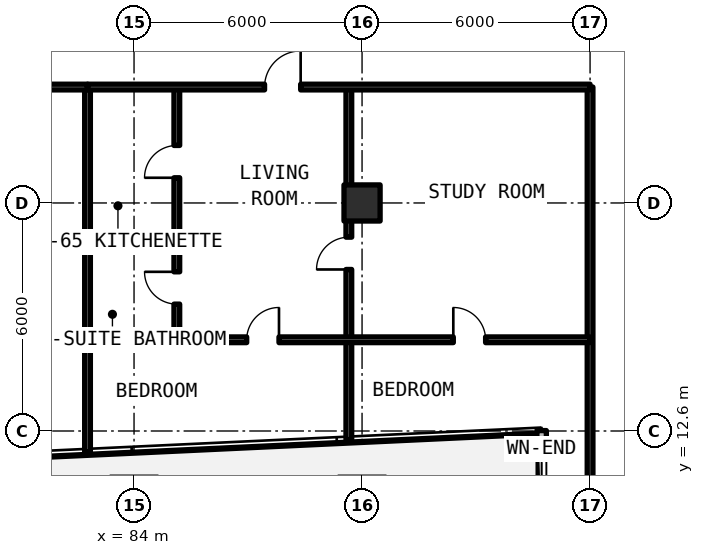
"""IFC4 building model, lengths in metres.
Left out: names, types, materials, properties, quantities, classifications, styles, units other than length and angle.
Written with IfcOpenShell. Run it as: python <this file> out.ifc"""

import sys

from ifc_helpers import new_model, si_unit, direction, frame, frame_2d, origin, origin_2d, place, context, subcontext, project, spatial, rectangle, extrude, element, fill, save


model = new_model("IFC4")
c1 = context("Model", 3, precision=1e-05, world=origin(), true_north=direction((0.0, 1.0)))
c2 = subcontext(c1, "Body", "Model", "MODEL_VIEW")
j1 = project(units=[si_unit("LENGTHUNIT", "METRE"), si_unit("PLANEANGLEUNIT", "RADIAN")], contexts=[c1])
p1 = place(None, origin())
s1 = spatial("IfcSite", under=j1, at=p1, CompositionType="ELEMENT")
p2 = place(p1, origin())
s2 = spatial("IfcBuilding", under=s1, at=p2, CompositionType="ELEMENT")
p3 = place(p2, frame((0.0, 0.0, 108.57)))
s3 = spatial("IfcBuildingStorey", under=s2, at=p3, CompositionType="ELEMENT", Elevation=108.57)
p4 = place(p3, frame((90.0, 18.6, 0.0), z_axis=(0.0, 0.0, 1.0), x_axis=(1.0, 0.0, 0.0)))
e1 = element("IfcColumn", 1, at=p4, inside=s3, PredefinedType="COLUMN", context=c2, shape_type="SweptSolid", body=[
    extrude(rectangle(XDim=0.95, YDim=0.95, at=origin_2d()), origin(), (0.0, 0.0, 1.0), 3.63),
])
p5 = place(p3, frame((94.725, 12.611, 0.0), z_axis=(0.0, 0.0, 1.0), x_axis=(0.0, -1.0, 0.0)))
e2 = element("IfcWall", 2, at=p5, inside=s3, PredefinedType="SOLIDWALL", context=c2, shape_type="SweptSolid", body=[
    extrude(rectangle(XDim=2.886, YDim=0.25, at=frame_2d((1.443, 0.0))), origin(), (0.0, 0.0, 1.0), 3.41),
])
p6 = place(p5, frame((0.743, 0.0, 0.78)))
e3 = element("IfcOpeningElement", 3, at=p6, cuts=e2, PredefinedType="OPENING", context=c2, shape_type="SweptSolid", body=[
    extrude(rectangle(XDim=1.4, YDim=1.65, at=frame_2d((0.7, 0.825))), frame((0.0, 0.135, 0.0), z_axis=(0.0, -1.0, 0.0), x_axis=(1.0, 0.0, 0.0)), (0.0, 0.0, 1.0), 0.27),
])
p7 = place(p3, frame((96.0, 9.725, 0.0), z_axis=(0.0, 0.0, 1.0), x_axis=(0.0, 1.0, 0.0)))
e4 = element("IfcWall", 4, at=p7, inside=s3, PredefinedType="SOLIDWALL", context=c2, shape_type="SweptSolid", body=[
    extrude(rectangle(XDim=11.925, YDim=0.15, at=frame_2d((5.962, 0.0))), origin(), (0.0, 0.0, 1.0), 2.63),
])
p8 = place(p3, frame((82.776, 12.05, 0.0), z_axis=(0.0, 0.0, 1.0), x_axis=(0.0, 1.0, 0.0)))
e5 = element("IfcWall", 5, at=p8, inside=s3, PredefinedType="SOLIDWALL", context=c2, shape_type="SweptSolid", body=[
    extrude(rectangle(XDim=9.6, YDim=0.15, at=frame_2d((4.8, 0.0))), origin(), (0.0, 0.0, 1.0), 2.63),
])
p9 = place(p3, frame((72.557, 21.65, 0.0), z_axis=(0.0, 0.0, 1.0), x_axis=(1.0, 0.0, 0.0)))
e6 = element("IfcWall", 6, at=p9, inside=s3, PredefinedType="SOLIDWALL", context=c2, shape_type="SweptSolid", body=[
    extrude(rectangle(XDim=10.219, YDim=0.15, at=frame_2d((5.109, 0.0))), origin(), (0.0, 0.0, 1.0), 2.63),
])
p10 = place(p9, frame((4.559, 0.0, 0.0)))
e7 = element("IfcOpeningElement", 7, at=p10, cuts=e6, PredefinedType="OPENING", context=c2, shape_type="SweptSolid", body=[
    extrude(rectangle(XDim=1.1, YDim=2.15, at=frame_2d((0.55, 1.075))), frame((0.0, 0.085, 0.0), z_axis=(0.0, -1.0, 0.0), x_axis=(1.0, 0.0, 0.0)), (0.0, 0.0, 1.0), 0.17),
])
p11 = place(p3, frame((89.652, 15.0, 0.0), z_axis=(0.0, 0.0, 1.0), x_axis=(0.0, 1.0, 0.0)))
e8 = element("IfcWall", 8, at=p11, inside=s3, PredefinedType="PARTITIONING", context=c2, shape_type="SweptSolid", body=[
    extrude(rectangle(XDim=6.65, YDim=0.15, at=frame_2d((3.325, 0.0))), origin(), (0.0, 0.0, 1.0), 2.63),
])
p12 = place(p11, frame((1.85, 0.0, 0.0)))
e9 = element("IfcOpeningElement", 9, at=p12, cuts=e8, PredefinedType="OPENING", context=c2, shape_type="SweptSolid", body=[
    extrude(rectangle(XDim=0.85, YDim=2.1, at=frame_2d((0.425, 1.05))), frame((0.0, 0.085, 0.0), z_axis=(0.0, -1.0, 0.0), x_axis=(1.0, 0.0, 0.0)), (0.0, 0.0, 1.0), 0.17),
])
p13 = place(p3, frame((82.776, 17.727, 0.0), z_axis=(0.0, 0.0, 1.0), x_axis=(1.0, 0.0, 0.0)))
e10 = element("IfcWall", 10, at=p13, inside=s3, PredefinedType="PARTITIONING", context=c2, shape_type="SweptSolid", body=[
    extrude(rectangle(XDim=2.35, YDim=0.15, at=frame_2d((1.175, 0.0))), origin(), (0.0, 0.0, 1.0), 2.63),
])
p14 = place(p3, frame((85.126, 15.0, 0.0), z_axis=(0.0, 0.0, 1.0), x_axis=(0.0, 1.0, 0.0)))
e11 = element("IfcWall", 11, at=p14, inside=s3, PredefinedType="PARTITIONING", context=c2, shape_type="SweptSolid", body=[
    extrude(rectangle(XDim=6.65, YDim=0.15, at=frame_2d((3.325, 0.0))), origin(), (0.0, 0.0, 1.0), 2.63),
])
p15 = place(p14, frame((0.938, 0.0, 0.0)))
e12 = element("IfcOpeningElement", 12, at=p15, cuts=e11, PredefinedType="OPENING", context=c2, shape_type="SweptSolid", body=[
    extrude(rectangle(XDim=0.85, YDim=2.1, at=frame_2d((0.425, 1.05))), frame((0.0, 0.085, 0.0), z_axis=(0.0, -1.0, 0.0), x_axis=(1.0, 0.0, 0.0)), (0.0, 0.0, 1.0), 0.17),
])
p16 = place(p14, frame((4.263, 0.0, 0.0)))
e13 = element("IfcOpeningElement", 13, at=p16, cuts=e11, PredefinedType="OPENING", context=c2, shape_type="SweptSolid", body=[
    extrude(rectangle(XDim=0.85, YDim=2.1, at=frame_2d((0.425, 1.05))), frame((0.0, 0.085, 0.0), z_axis=(0.0, -1.0, 0.0), x_axis=(1.0, 0.0, 0.0)), (0.0, 0.0, 1.0), 0.17),
])
p17 = place(p3, frame((89.652, 12.373, 0.0), z_axis=(0.0, 0.0, 1.0), x_axis=(0.0, 1.0, 0.0)))
e14 = element("IfcWall", 14, at=p17, inside=s3, PredefinedType="PARTITIONING", context=c2, shape_type="SweptSolid", body=[
    extrude(rectangle(XDim=2.627, YDim=0.15, at=frame_2d((1.313, 0.0))), origin(), (0.0, 0.0, 1.0), 2.63),
])
p18 = place(p3, frame((82.776, 15.0, 0.0), z_axis=(0.0, 0.0, 1.0), x_axis=(1.0, 0.0, 0.0)))
e15 = element("IfcWall", 15, at=p18, inside=s3, PredefinedType="PARTITIONING", context=c2, shape_type="SweptSolid", body=[
    extrude(rectangle(XDim=13.224, YDim=0.15, at=frame_2d((6.612, 0.0))), origin(), (0.0, 0.0, 1.0), 2.63),
])
p19 = place(p18, frame((4.188, 0.0, 0.0)))
e16 = element("IfcOpeningElement", 16, at=p19, cuts=e15, PredefinedType="OPENING", context=c2, shape_type="SweptSolid", body=[
    extrude(rectangle(XDim=0.85, YDim=2.1, at=frame_2d((0.425, 1.05))), frame((0.0, 0.085, 0.0), z_axis=(0.0, -1.0, 0.0), x_axis=(1.0, 0.0, 0.0)), (0.0, 0.0, 1.0), 0.17),
])
p20 = place(p18, frame((9.625, 0.0, 0.0)))
e17 = element("IfcOpeningElement", 17, at=p20, cuts=e15, PredefinedType="OPENING", context=c2, shape_type="SweptSolid", body=[
    extrude(rectangle(XDim=0.85, YDim=2.1, at=frame_2d((0.425, 1.05))), frame((0.0, 0.085, 0.0), z_axis=(0.0, -1.0, 0.0), x_axis=(1.0, 0.0, 0.0)), (0.0, 0.0, 1.0), 0.17),
])
p21 = place(p3, frame((82.776, 21.65, 0.0), z_axis=(0.0, 0.0, 1.0), x_axis=(1.0, 0.0, 0.0)))
e18 = element("IfcWall", 18, at=p21, inside=s3, PredefinedType="SOLIDWALL", context=c2, shape_type="SweptSolid", body=[
    extrude(rectangle(XDim=13.224, YDim=0.15, at=frame_2d((6.612, 0.0))), origin(), (0.0, 0.0, 1.0), 2.63),
])
p22 = place(p21, frame((4.658, 0.0, 0.0)))
e19 = element("IfcOpeningElement", 19, at=p22, cuts=e18, PredefinedType="OPENING", context=c2, shape_type="SweptSolid", body=[
    extrude(rectangle(XDim=0.95, YDim=2.15, at=frame_2d((0.475, 1.075))), frame((0.0, 0.085, 0.0), z_axis=(0.0, -1.0, 0.0), x_axis=(1.0, 0.0, 0.0)), (0.0, 0.0, 1.0), 0.17),
])
p23 = place(p6, origin())
e20 = element("IfcWindow", 20, at=p23, inside=s3, PartitioningType="SINGLE_PANEL", PredefinedType="WINDOW", context=c2, shape_type="SweptSolid", body=[
    extrude(rectangle(XDim=1.4, YDim=1.65, at=frame_2d((0.7, 0.825))), frame((0.0, 0.03, 0.0), z_axis=(0.0, -1.0, 0.0), x_axis=(1.0, 0.0, 0.0)), (0.0, 0.0, 1.0), 0.06),
])
fill(e3, e20)
p24 = place(p12, origin())
e21 = element("IfcDoor", 21, at=p24, inside=s3, OperationType="SINGLE_SWING_LEFT", PredefinedType="DOOR", context=c2, shape_type="SweptSolid", body=[
    extrude(rectangle(XDim=0.85, YDim=2.1, at=frame_2d((0.425, 1.05))), frame((0.0, 0.025, 0.0), z_axis=(0.0, -1.0, 0.0), x_axis=(1.0, 0.0, 0.0)), (0.0, 0.0, 1.0), 0.05),
])
fill(e9, e21)
p25 = place(p15, origin())
e22 = element("IfcDoor", 22, at=p25, inside=s3, OperationType="SINGLE_SWING_RIGHT", PredefinedType="DOOR", context=c2, shape_type="SweptSolid", body=[
    extrude(rectangle(XDim=0.85, YDim=2.1, at=frame_2d((0.425, 1.05))), frame((0.0, 0.025, 0.0), z_axis=(0.0, -1.0, 0.0), x_axis=(1.0, 0.0, 0.0)), (0.0, 0.0, 1.0), 0.05),
])
fill(e12, e22)
p26 = place(p16, origin())
e23 = element("IfcDoor", 23, at=p26, inside=s3, OperationType="SINGLE_SWING_LEFT", PredefinedType="DOOR", context=c2, shape_type="SweptSolid", body=[
    extrude(rectangle(XDim=0.85, YDim=2.1, at=frame_2d((0.425, 1.05))), frame((0.0, 0.025, 0.0), z_axis=(0.0, -1.0, 0.0), x_axis=(1.0, 0.0, 0.0)), (0.0, 0.0, 1.0), 0.05),
])
fill(e13, e23)
p27 = place(p19, origin())
e24 = element("IfcDoor", 24, at=p27, inside=s3, OperationType="SINGLE_SWING_RIGHT", PredefinedType="DOOR", context=c2, shape_type="SweptSolid", body=[
    extrude(rectangle(XDim=0.85, YDim=2.1, at=frame_2d((0.425, 1.05))), frame((0.0, 0.025, 0.0), z_axis=(0.0, -1.0, 0.0), x_axis=(1.0, 0.0, 0.0)), (0.0, 0.0, 1.0), 0.05),
])
fill(e16, e24)
p28 = place(p20, origin())
e25 = element("IfcDoor", 25, at=p28, inside=s3, OperationType="SINGLE_SWING_LEFT", PredefinedType="DOOR", context=c2, shape_type="SweptSolid", body=[
    extrude(rectangle(XDim=0.85, YDim=2.1, at=frame_2d((0.425, 1.05))), frame((0.0, 0.025, 0.0), z_axis=(0.0, -1.0, 0.0), x_axis=(1.0, 0.0, 0.0)), (0.0, 0.0, 1.0), 0.05),
])
fill(e17, e25)
p29 = place(p22, origin())
e26 = element("IfcDoor", 26, at=p29, inside=s3, OperationType="SINGLE_SWING_RIGHT", PredefinedType="DOOR", context=c2, shape_type="SweptSolid", body=[
    extrude(rectangle(XDim=0.95, YDim=2.15, at=frame_2d((0.475, 1.075))), frame((0.0, 0.025, 0.0), z_axis=(0.0, -1.0, 0.0), x_axis=(1.0, 0.0, 0.0)), (0.0, 0.0, 1.0), 0.05),
])
fill(e19, e26)
save(model, sys.argv[1])
